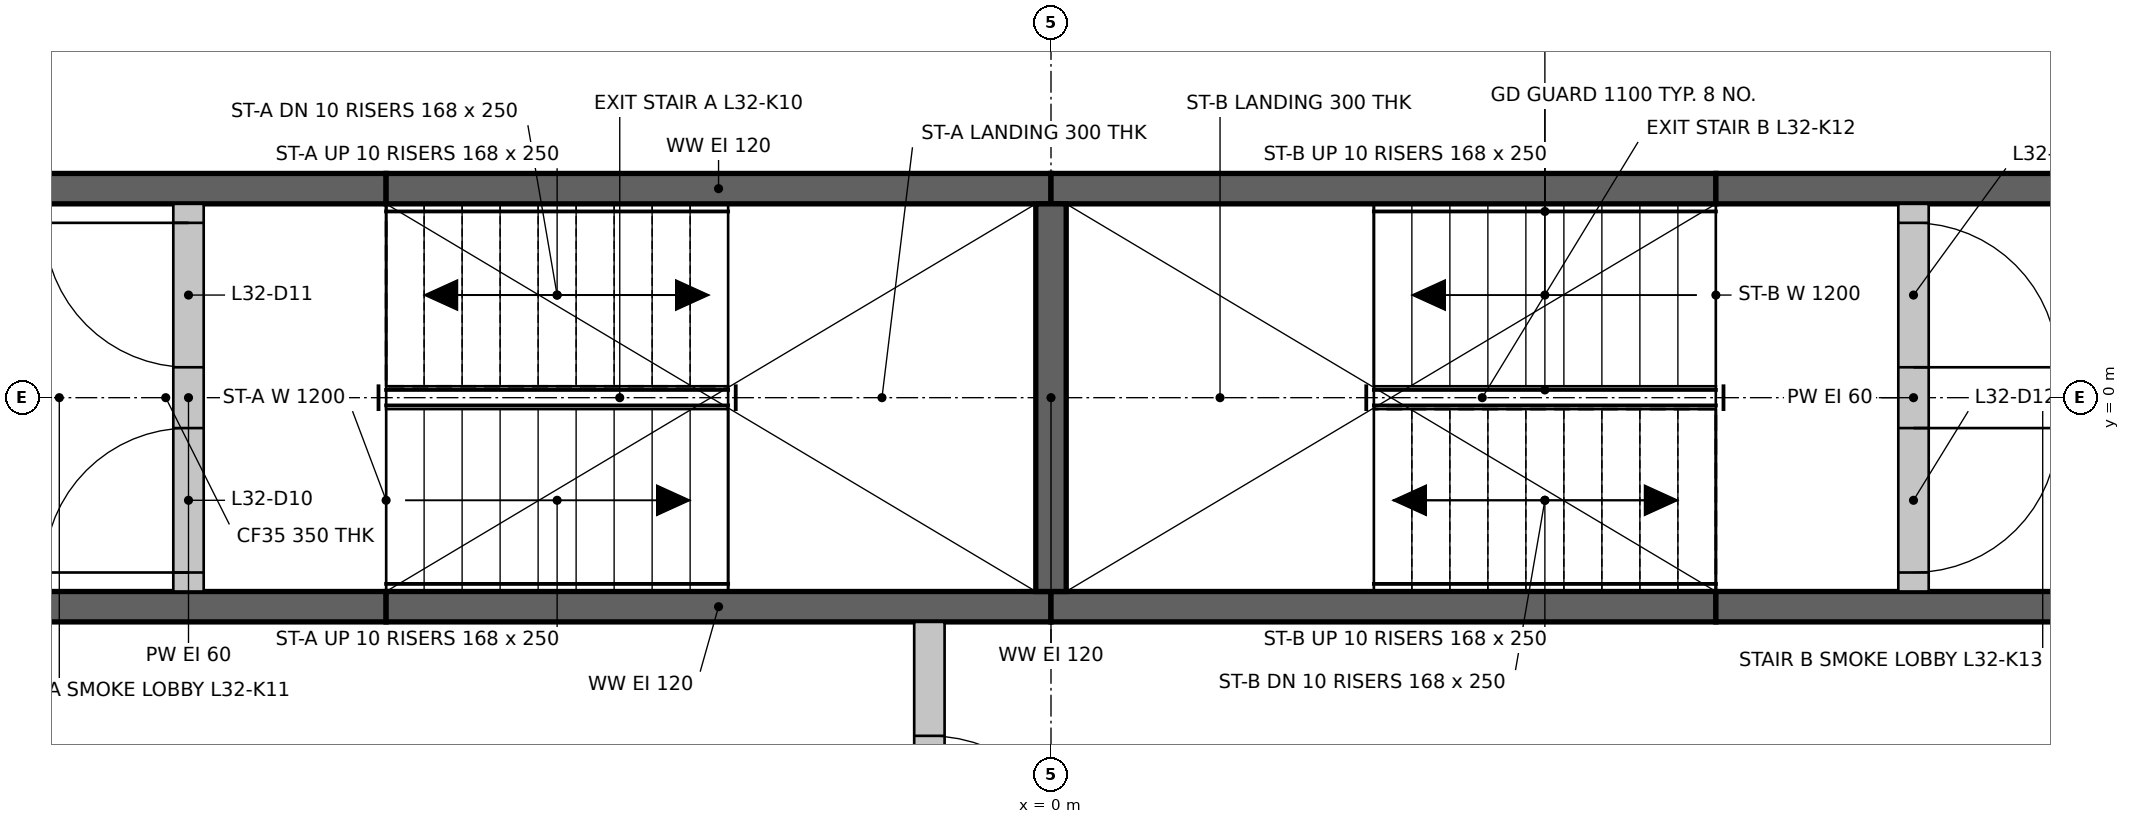
"""IFC4 building model, lengths in metres.
Left out: names, types, materials, properties, quantities, classifications, styles, units other than length and angle.
Written with IfcOpenShell. Run it as: python <this file> out.ifc"""

import sys

from ifc_helpers import new_model, si_unit, direction, frame, frame_2d, origin, place, context, subcontext, project, spatial, rectangle, extrude, element, fill, save


model = new_model("IFC4")
c1 = context("Model", 3, precision=1e-05, world=origin(), true_north=direction((0.0, 1.0)))
c2 = subcontext(c1, "Body", "Model", "MODEL_VIEW")
j1 = project(units=[si_unit("LENGTHUNIT", "METRE"), si_unit("PLANEANGLEUNIT", "RADIAN")], contexts=[c1])
p1 = place(None, origin())
s1 = spatial("IfcSite", under=j1, at=p1, CompositionType="ELEMENT")
p2 = place(p1, origin())
s2 = spatial("IfcBuilding", under=s1, at=p2, CompositionType="ELEMENT")
p3 = place(p2, frame((0.0, 0.0, 127.65)))
s3 = spatial("IfcBuildingStorey", under=s2, at=p3, CompositionType="ELEMENT", Elevation=127.65)
p4 = place(p3, frame((-7.274, -1.375, 0.0), z_axis=(0.0, 0.0, 1.0), x_axis=(1.0, 0.0, 0.0)))
e1 = element("IfcWall", 1, at=p4, inside=s3, PredefinedType="SHEAR", context=c2, shape_type="SweptSolid", body=[
    extrude(rectangle(XDim=2.9, YDim=0.2, at=frame_2d((1.45, 0.0))), origin(), (0.0, 0.0, 1.0), 3.0),
])
for number, where, z_axis, x_axis in (
    (2, (-4.374, -1.375, 0.0), (0.0, 0.0, 1.0), (1.0, 0.0, 0.0)),
    (3, (0.0, -1.375, 0.0), (0.0, 0.0, 1.0), (1.0, 0.0, 0.0)),
):
    element("IfcWall", number, at=place(p3, frame(where, z_axis=z_axis, x_axis=x_axis)), inside=s3, PredefinedType="SHEAR", context=c2, shape_type="SweptSolid", body=[
        extrude(rectangle(XDim=4.374, YDim=0.2, at=frame_2d((2.187, 0.0))), origin(), (0.0, 0.0, 1.0), 3.0),
    ])
for number, where, z_axis, x_axis in (
    (4, (4.374, -1.375, 0.0), (0.0, 0.0, 1.0), (1.0, 0.0, 0.0)),
    (5, (-7.274, 1.375, 0.0), (0.0, 0.0, 1.0), (1.0, 0.0, 0.0)),
):
    element("IfcWall", number, at=place(p3, frame(where, z_axis=z_axis, x_axis=x_axis)), inside=s3, PredefinedType="SHEAR", context=c2, shape_type="SweptSolid", body=[
        extrude(rectangle(XDim=2.9, YDim=0.2, at=frame_2d((1.45, 0.0))), origin(), (0.0, 0.0, 1.0), 3.0),
    ])
for number, where, z_axis, x_axis in (
    (6, (-4.374, 1.375, 0.0), (0.0, 0.0, 1.0), (1.0, 0.0, 0.0)),
    (7, (0.0, 1.375, 0.0), (0.0, 0.0, 1.0), (1.0, 0.0, 0.0)),
):
    element("IfcWall", number, at=place(p3, frame(where, z_axis=z_axis, x_axis=x_axis)), inside=s3, PredefinedType="SHEAR", context=c2, shape_type="SweptSolid", body=[
        extrude(rectangle(XDim=4.374, YDim=0.2, at=frame_2d((2.187, 0.0))), origin(), (0.0, 0.0, 1.0), 3.0),
    ])
p5 = place(p3, frame((4.374, 1.375, 0.0), z_axis=(0.0, 0.0, 1.0), x_axis=(1.0, 0.0, 0.0)))
e8 = element("IfcWall", 8, at=p5, inside=s3, PredefinedType="SHEAR", context=c2, shape_type="SweptSolid", body=[
    extrude(rectangle(XDim=2.9, YDim=0.2, at=frame_2d((1.45, 0.0))), origin(), (0.0, 0.0, 1.0), 3.0),
])
p6 = place(p3, frame((0.0, -1.275, 0.0), z_axis=(0.0, 0.0, 1.0), x_axis=(0.0, 1.0, 0.0)))
e9 = element("IfcWall", 9, at=p6, inside=s3, PredefinedType="SHEAR", context=c2, shape_type="SweptSolid", body=[
    extrude(rectangle(XDim=2.55, YDim=0.2, at=frame_2d((1.275, 0.0))), origin(), (0.0, 0.0, 1.0), 3.0),
])
p7 = place(p3, frame((-0.8, -3.974, 0.0), z_axis=(0.0, 0.0, 1.0), x_axis=(0.0, 1.0, 0.0)))
e10 = element("IfcWall", 10, at=p7, inside=s3, PredefinedType="PARTITIONING", context=c2, shape_type="SweptSolid", body=[
    extrude(rectangle(XDim=2.499, YDim=0.2, at=frame_2d((1.25, 0.0))), origin(), (0.0, 0.0, 1.0), 3.0),
])
p8 = place(p7, frame((0.75, 0.0, 0.0)))
e11 = element("IfcOpeningElement", 11, at=p8, cuts=e10, PredefinedType="OPENING", context=c2, shape_type="SweptSolid", body=[
    extrude(rectangle(XDim=1.0, YDim=2.1, at=frame_2d((0.5, 1.05))), frame((0.0, 0.11, 0.0), z_axis=(0.0, -1.0, 0.0), x_axis=(1.0, 0.0, 0.0)), (0.0, 0.0, 1.0), 0.22),
])
p9 = place(p3, frame((-5.674, -1.275, 0.0), z_axis=(0.0, 0.0, 1.0), x_axis=(0.0, 1.0, 0.0)))
e12 = element("IfcWall", 12, at=p9, inside=s3, PredefinedType="PARTITIONING", context=c2, shape_type="SweptSolid", body=[
    extrude(rectangle(XDim=2.55, YDim=0.2, at=frame_2d((1.275, 0.0))), origin(), (0.0, 0.0, 1.0), 3.0),
])
p10 = place(p9, frame((0.125, 0.0, 0.0)))
e13 = element("IfcOpeningElement", 13, at=p10, cuts=e12, PredefinedType="OPENING", context=c2, shape_type="SweptSolid", body=[
    extrude(rectangle(XDim=0.95, YDim=2.1, at=frame_2d((0.475, 1.05))), frame((0.0, 0.11, 0.0), z_axis=(0.0, -1.0, 0.0), x_axis=(1.0, 0.0, 0.0)), (0.0, 0.0, 1.0), 0.22),
])
p11 = place(p9, frame((1.475, 0.0, 0.0)))
e14 = element("IfcOpeningElement", 14, at=p11, cuts=e12, PredefinedType="OPENING", context=c2, shape_type="SweptSolid", body=[
    extrude(rectangle(XDim=0.95, YDim=2.1, at=frame_2d((0.475, 1.05))), frame((0.0, 0.11, 0.0), z_axis=(0.0, -1.0, 0.0), x_axis=(1.0, 0.0, 0.0)), (0.0, 0.0, 1.0), 0.22),
])
p12 = place(p3, frame((5.674, -1.275, 0.0), z_axis=(0.0, 0.0, 1.0), x_axis=(0.0, 1.0, 0.0)))
e15 = element("IfcWall", 15, at=p12, inside=s3, PredefinedType="PARTITIONING", context=c2, shape_type="SweptSolid", body=[
    extrude(rectangle(XDim=2.55, YDim=0.2, at=frame_2d((1.275, 0.0))), origin(), (0.0, 0.0, 1.0), 3.0),
])
p13 = place(p12, frame((0.125, 0.0, 0.0)))
e16 = element("IfcOpeningElement", 16, at=p13, cuts=e15, PredefinedType="OPENING", context=c2, shape_type="SweptSolid", body=[
    extrude(rectangle(XDim=0.95, YDim=2.1, at=frame_2d((0.475, 1.05))), frame((0.0, 0.11, 0.0), z_axis=(0.0, -1.0, 0.0), x_axis=(1.0, 0.0, 0.0)), (0.0, 0.0, 1.0), 0.22),
])
p14 = place(p12, frame((1.475, 0.0, 0.0)))
e17 = element("IfcOpeningElement", 17, at=p14, cuts=e15, PredefinedType="OPENING", context=c2, shape_type="SweptSolid", body=[
    extrude(rectangle(XDim=0.95, YDim=2.1, at=frame_2d((0.475, 1.05))), frame((0.0, 0.11, 0.0), z_axis=(0.0, -1.0, 0.0), x_axis=(1.0, 0.0, 0.0)), (0.0, 0.0, 1.0), 0.22),
])
p15 = place(p10, origin())
e18 = element("IfcDoor", 18, at=p15, inside=s3, OperationType="SINGLE_SWING_LEFT", PredefinedType="DOOR", context=c2, shape_type="SweptSolid", body=[
    extrude(rectangle(XDim=0.95, YDim=2.1, at=frame_2d((0.475, 1.05))), frame((0.0, 0.025, 0.0), z_axis=(0.0, -1.0, 0.0), x_axis=(1.0, 0.0, 0.0)), (0.0, 0.0, 1.0), 0.05),
])
fill(e13, e18)
p16 = place(p11, origin())
e19 = element("IfcDoor", 19, at=p16, inside=s3, OperationType="SINGLE_SWING_RIGHT", PredefinedType="DOOR", context=c2, shape_type="SweptSolid", body=[
    extrude(rectangle(XDim=0.95, YDim=2.1, at=frame_2d((0.475, 1.05))), frame((0.0, 0.025, 0.0), z_axis=(0.0, -1.0, 0.0), x_axis=(1.0, 0.0, 0.0)), (0.0, 0.0, 1.0), 0.05),
])
fill(e14, e19)
p17 = place(p13, frame((0.95, 0.0, 0.0), z_axis=(0.0, 0.0, 1.0), x_axis=(-1.0, 0.0, 0.0)))
e20 = element("IfcDoor", 20, at=p17, inside=s3, OperationType="SINGLE_SWING_RIGHT", PredefinedType="DOOR", context=c2, shape_type="SweptSolid", body=[
    extrude(rectangle(XDim=0.95, YDim=2.1, at=frame_2d((0.475, 1.05))), frame((0.0, 0.025, 0.0), z_axis=(0.0, -1.0, 0.0), x_axis=(1.0, 0.0, 0.0)), (0.0, 0.0, 1.0), 0.05),
])
fill(e16, e20)
p18 = place(p14, frame((0.95, 0.0, 0.0), z_axis=(0.0, 0.0, 1.0), x_axis=(-1.0, 0.0, 0.0)))
e21 = element("IfcDoor", 21, at=p18, inside=s3, OperationType="SINGLE_SWING_LEFT", PredefinedType="DOOR", context=c2, shape_type="SweptSolid", body=[
    extrude(rectangle(XDim=0.95, YDim=2.1, at=frame_2d((0.475, 1.05))), frame((0.0, 0.025, 0.0), z_axis=(0.0, -1.0, 0.0), x_axis=(1.0, 0.0, 0.0)), (0.0, 0.0, 1.0), 0.05),
])
fill(e17, e21)
p19 = place(p8, frame((1.0, 0.0, 0.0), z_axis=(0.0, 0.0, 1.0), x_axis=(-1.0, 0.0, 0.0)))
e22 = element("IfcDoor", 22, at=p19, inside=s3, OperationType="SINGLE_SWING_LEFT", PredefinedType="DOOR", context=c2, shape_type="SweptSolid", body=[
    extrude(rectangle(XDim=1.0, YDim=2.1, at=frame_2d((0.5, 1.05))), frame((0.0, 0.025, 0.0), z_axis=(0.0, -1.0, 0.0), x_axis=(1.0, 0.0, 0.0)), (0.0, 0.0, 1.0), 0.05),
])
fill(e11, e22)
save(model, sys.argv[1])
